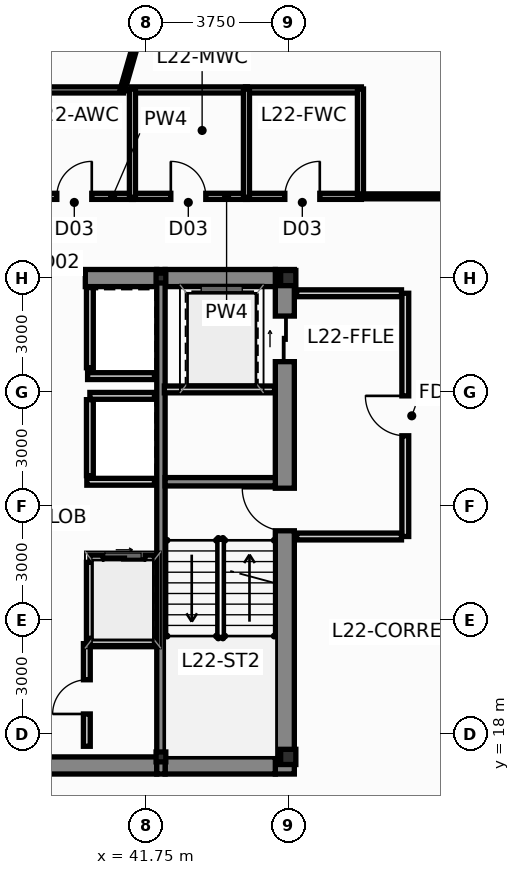
"""IFC4 building model, lengths in metres.
Left out: names, types, materials, properties, quantities, classifications, styles, units other than length and angle.
Written with IfcOpenShell. Run it as: python <this file> out.ifc"""

import sys

from ifc_helpers import new_model, si_unit, direction, frame, frame_2d, origin, origin_2d, place, context, subcontext, project, spatial, rectangle, i_section, extrude, source, transform, mapped, element, fill, save


model = new_model("IFC4")
c1 = context("Model", 3, precision=1e-05, world=origin(), true_north=direction((0.0, 1.0)))
c2 = subcontext(c1, "Body", "Model", "MODEL_VIEW")
j1 = project(units=[si_unit("LENGTHUNIT", "METRE"), si_unit("PLANEANGLEUNIT", "RADIAN")], contexts=[c1])
p1 = place(None, origin())
s1 = spatial("IfcSite", under=j1, at=p1, CompositionType="ELEMENT")
p2 = place(p1, origin())
s2 = spatial("IfcBuilding", under=s1, at=p2, CompositionType="ELEMENT")
p3 = place(p2, frame((0.0, 0.0, 87.15)))
s3 = spatial("IfcBuildingStorey", under=s2, at=p3, CompositionType="ELEMENT", Elevation=87.15)
m1 = source(origin(), c2, "Body", "SweptSolid", [
    extrude(i_section(OverallWidth=0.4, OverallDepth=0.4, WebThickness=0.02, FlangeThickness=0.032, at=origin_2d()), origin(), (0.0, 0.0, 1.0), 3.65),
])
for number, where, z_axis, x_axis in (
    (1, (45.5, 17.4, 0.0), (0.0, 0.0, 1.0), (1.0, 0.0, 0.0)),
    (2, (45.5, 30.0, 0.0), (0.0, 0.0, 1.0), (1.0, 0.0, 0.0)),
):
    element("IfcColumn", number, at=place(p3, frame(where, z_axis=z_axis, x_axis=x_axis)), inside=s3, PredefinedType="COLUMN", context=c2, shape_type="MappedRepresentation", body=[
        mapped(m1, transform((0.0, 0.0, 0.0), scale=1.0)),
    ])
m2 = source(origin(), c2, "Body", "SweptSolid", [
    extrude(i_section(OverallWidth=0.256, OverallDepth=0.26, WebThickness=0.01, FlangeThickness=0.017, at=origin_2d()), origin(), (0.0, 0.0, 1.0), 3.65),
])
for number, where, z_axis, x_axis in (
    (3, (42.15, 17.4, 0.0), (0.0, 0.0, 1.0), (1.0, 0.0, 0.0)),
    (4, (42.15, 30.0, 0.0), (0.0, 0.0, 1.0), (1.0, 0.0, 0.0)),
):
    element("IfcColumn", number, at=place(p3, frame(where, z_axis=z_axis, x_axis=x_axis)), inside=s3, PredefinedType="COLUMN", context=c2, shape_type="MappedRepresentation", body=[
        mapped(m2, transform((0.0, 0.0, 0.0), scale=1.0)),
    ])
p4 = place(p3, frame((45.41, 16.95, 0.0), z_axis=(0.0, 0.0, 1.0), x_axis=(0.0, 1.0, 0.0)))
e5 = element("IfcWall", 5, at=p4, inside=s3, PredefinedType="SHEAR", context=c2, shape_type="SweptSolid", body=[
    extrude(rectangle(XDim=13.275, YDim=0.5, at=frame_2d((6.638, 0.0))), origin(), (0.0, 0.0, 1.0), 3.65),
])
p5 = place(p4, frame((6.4, 0.0, 0.0)))
e6 = element("IfcOpeningElement", 6, at=p5, cuts=e5, PredefinedType="OPENING", context=c2, shape_type="SweptSolid", body=[
    extrude(rectangle(XDim=1.12, YDim=2.15, at=frame_2d((0.56, 1.075))), frame((0.0, 0.262, 0.0), z_axis=(0.0, -1.0, 0.0), x_axis=(1.0, 0.0, 0.0)), (0.0, 0.0, 1.0), 0.524),
])
p6 = place(p4, frame((10.85, 0.0, 0.0)))
e7 = element("IfcOpeningElement", 7, at=p6, cuts=e5, PredefinedType="OPENING", context=c2, shape_type="SweptSolid", body=[
    extrude(rectangle(XDim=1.2, YDim=2.2, at=frame_2d((0.6, 1.1))), frame((0.0, 0.262, 0.0), z_axis=(0.0, -1.0, 0.0), x_axis=(1.0, 0.0, 0.0)), (0.0, 0.0, 1.0), 0.524),
])
p7 = place(p3, frame((33.96, 17.175, 0.0), z_axis=(0.0, 0.0, 1.0), x_axis=(1.0, 0.0, 0.0)))
e8 = element("IfcWall", 8, at=p7, inside=s3, PredefinedType="SHEAR", context=c2, shape_type="SweptSolid", body=[
    extrude(rectangle(XDim=8.08, YDim=0.45, at=frame_2d((4.04, 0.0))), origin(), (0.0, 0.0, 1.0), 3.65),
])
p8 = place(p3, frame((42.26, 17.175, 0.0), z_axis=(0.0, 0.0, 1.0), x_axis=(1.0, 0.0, 0.0)))
e9 = element("IfcWall", 9, at=p8, inside=s3, PredefinedType="SHEAR", context=c2, shape_type="SweptSolid", body=[
    extrude(rectangle(XDim=2.9, YDim=0.45, at=frame_2d((1.45, 0.0))), origin(), (0.0, 0.0, 1.0), 3.65),
])
p9 = place(p3, frame((40.16, 30.0, 0.0), z_axis=(0.0, 0.0, 1.0), x_axis=(1.0, 0.0, 0.0)))
e10 = element("IfcWall", 10, at=p9, inside=s3, PredefinedType="SHEAR", context=c2, shape_type="SweptSolid", body=[
    extrude(rectangle(XDim=1.88, YDim=0.45, at=frame_2d((0.94, 0.0))), origin(), (0.0, 0.0, 1.0), 3.65),
])
p10 = place(p3, frame((42.26, 30.0, 0.0), z_axis=(0.0, 0.0, 1.0), x_axis=(1.0, 0.0, 0.0)))
e11 = element("IfcWall", 11, at=p10, inside=s3, PredefinedType="SHEAR", context=c2, shape_type="SweptSolid", body=[
    extrude(rectangle(XDim=2.9, YDim=0.45, at=frame_2d((1.45, 0.0))), origin(), (0.0, 0.0, 1.0), 3.65),
])
p11 = place(p3, frame((42.15, 16.95, 0.0), z_axis=(0.0, 0.0, 1.0), x_axis=(0.0, 1.0, 0.0)))
e12 = element("IfcWall", 12, at=p11, inside=s3, PredefinedType="SHEAR", context=c2, shape_type="SweptSolid", body=[
    extrude(rectangle(XDim=13.275, YDim=0.22, at=frame_2d((6.638, 0.0))), origin(), (0.0, 0.0, 1.0), 3.65),
])
p12 = place(p3, frame((42.26, 24.64, 0.0), z_axis=(0.0, 0.0, 1.0), x_axis=(1.0, 0.0, 0.0)))
e13 = element("IfcWall", 13, at=p12, inside=s3, PredefinedType="SHEAR", context=c2, shape_type="SweptSolid", body=[
    extrude(rectangle(XDim=2.9, YDim=0.22, at=frame_2d((1.45, 0.0))), origin(), (0.0, 0.0, 1.0), 3.65),
])
p13 = place(p3, frame((40.28, 22.62, 0.0), z_axis=(0.0, 0.0, 1.0), x_axis=(1.0, 0.0, 0.0)))
e14 = element("IfcWall", 14, at=p13, inside=s3, PredefinedType="PARTITIONING", context=c2, shape_type="SweptSolid", body=[
    extrude(rectangle(XDim=1.7, YDim=0.18, at=frame_2d((0.85, 0.0))), origin(), (0.0, 0.0, 1.0), 3.4),
])
p14 = place(p13, frame((0.35, 0.0, 0.0)))
e15 = element("IfcOpeningElement", 15, at=p14, cuts=e14, PredefinedType="OPENING", context=c2, shape_type="SweptSolid", body=[
    extrude(rectangle(XDim=1.1, YDim=2.2, at=frame_2d((0.55, 1.1))), frame((0.0, 0.102, 0.0), z_axis=(0.0, -1.0, 0.0), x_axis=(1.0, 0.0, 0.0)), (0.0, 0.0, 1.0), 0.204),
])
p15 = place(p3, frame((40.28, 20.52, 0.0), z_axis=(0.0, 0.0, 1.0), x_axis=(0.0, 1.0, 0.0)))
e16 = element("IfcWall", 16, at=p15, inside=s3, PredefinedType="PARTITIONING", context=c2, shape_type="SweptSolid", body=[
    extrude(rectangle(XDim=2.0, YDim=0.18, at=frame_2d((1.0, 0.0))), origin(), (0.0, 0.0, 1.0), 3.4),
])
p16 = place(p3, frame((40.28, 26.9, 0.0), z_axis=(0.0, 0.0, 1.0), x_axis=(1.0, 0.0, 0.0)))
e17 = element("IfcWall", 17, at=p16, inside=s3, PredefinedType="PARTITIONING", context=c2, shape_type="SweptSolid", body=[
    extrude(rectangle(XDim=1.7, YDim=0.18, at=frame_2d((0.85, 0.0))), origin(), (0.0, 0.0, 1.0), 3.4),
])
p17 = place(p3, frame((40.28, 24.8, 0.0), z_axis=(0.0, 0.0, 1.0), x_axis=(0.0, 1.0, 0.0)))
e18 = element("IfcWall", 18, at=p17, inside=s3, PredefinedType="PARTITIONING", context=c2, shape_type="SweptSolid", body=[
    extrude(rectangle(XDim=2.0, YDim=0.18, at=frame_2d((1.0, 0.0))), origin(), (0.0, 0.0, 1.0), 3.4),
])
p18 = place(p3, frame((40.2, 24.64, 0.0), z_axis=(0.0, 0.0, 1.0), x_axis=(1.0, 0.0, 0.0)))
e19 = element("IfcWall", 19, at=p18, inside=s3, PredefinedType="PARTITIONING", context=c2, shape_type="SweptSolid", body=[
    extrude(rectangle(XDim=1.78, YDim=0.18, at=frame_2d((0.89, 0.0))), origin(), (0.0, 0.0, 1.0), 3.4),
])
p19 = place(p3, frame((40.22, 27.42, 0.0), z_axis=(0.0, 0.0, 1.0), x_axis=(1.0, 0.0, 0.0)))
e20 = element("IfcWall", 20, at=p19, inside=s3, PredefinedType="PARTITIONING", context=c2, shape_type="SweptSolid", body=[
    extrude(rectangle(XDim=1.76, YDim=0.18, at=frame_2d((0.88, 0.0))), origin(), (0.0, 0.0, 1.0), 3.4),
])
p20 = place(p3, frame((40.28, 27.64, 0.0), z_axis=(0.0, 0.0, 1.0), x_axis=(0.0, 1.0, 0.0)))
e21 = element("IfcWall", 21, at=p20, inside=s3, PredefinedType="PARTITIONING", context=c2, shape_type="SweptSolid", body=[
    extrude(rectangle(XDim=2.11, YDim=0.18, at=frame_2d((1.055, 0.0))), origin(), (0.0, 0.0, 1.0), 3.4),
])
p21 = place(p3, frame((48.58, 23.2, 0.0), z_axis=(0.0, 0.0, 1.0), x_axis=(0.0, 1.0, 0.0)))
e22 = element("IfcWall", 22, at=p21, inside=s3, PredefinedType="PARTITIONING", context=c2, shape_type="SweptSolid", body=[
    extrude(rectangle(XDim=6.4, YDim=0.18, at=frame_2d((3.2, 0.0))), origin(), (0.0, 0.0, 1.0), 3.027),
])
p22 = place(p21, frame((2.65, 0.0, 0.0)))
e23 = element("IfcOpeningElement", 23, at=p22, cuts=e22, PredefinedType="OPENING", context=c2, shape_type="SweptSolid", body=[
    extrude(rectangle(XDim=1.05, YDim=2.15, at=frame_2d((0.525, 1.075))), frame((0.0, 0.102, 0.0), z_axis=(0.0, -1.0, 0.0), x_axis=(1.0, 0.0, 0.0)), (0.0, 0.0, 1.0), 0.204),
])
p23 = place(p3, frame((45.72, 23.2, 0.0), z_axis=(0.0, 0.0, 1.0), x_axis=(1.0, 0.0, 0.0)))
e24 = element("IfcWall", 24, at=p23, inside=s3, PredefinedType="PARTITIONING", context=c2, shape_type="SweptSolid", body=[
    extrude(rectangle(XDim=2.76, YDim=0.18, at=frame_2d((1.38, 0.0))), origin(), (0.0, 0.0, 1.0), 3.4),
])
p24 = place(p3, frame((45.72, 29.6, 0.0), z_axis=(0.0, 0.0, 1.0), x_axis=(1.0, 0.0, 0.0)))
e25 = element("IfcWall", 25, at=p24, inside=s3, PredefinedType="PARTITIONING", context=c2, shape_type="SweptSolid", body=[
    extrude(rectangle(XDim=2.76, YDim=0.18, at=frame_2d((1.38, 0.0))), origin(), (0.0, 0.0, 1.0), 2.783),
])
p25 = place(p3, frame((42.24, 27.07, 0.0), z_axis=(0.0, 0.0, 1.0), x_axis=(1.0, 0.0, 0.0)))
e26 = element("IfcWall", 26, at=p25, inside=s3, PredefinedType="PARTITIONING", context=c2, shape_type="SweptSolid", body=[
    extrude(rectangle(XDim=2.9, YDim=0.18, at=frame_2d((1.45, 0.0))), origin(), (0.0, 0.0, 1.0), 3.4),
])
p26 = place(p3, frame((40.22, 20.42, 0.0), z_axis=(0.0, 0.0, 1.0), x_axis=(1.0, 0.0, 0.0)))
e27 = element("IfcWall", 27, at=p26, inside=s3, PredefinedType="PARTITIONING", context=c2, shape_type="SweptSolid", body=[
    extrude(rectangle(XDim=1.76, YDim=0.18, at=frame_2d((0.88, 0.0))), origin(), (0.0, 0.0, 1.0), 3.4),
])
p27 = place(p3, frame((40.2, 17.68, 0.0), z_axis=(0.0, 0.0, 1.0), x_axis=(0.0, 1.0, 0.0)))
e28 = element("IfcWall", 28, at=p27, inside=s3, PredefinedType="PARTITIONING", context=c2, shape_type="SweptSolid", body=[
    extrude(rectangle(XDim=2.7, YDim=0.18, at=frame_2d((1.35, 0.0))), origin(), (0.0, 0.0, 1.0), 3.4),
])
p28 = place(p27, frame((0.85, 0.0, 0.0)))
e29 = element("IfcOpeningElement", 29, at=p28, cuts=e28, PredefinedType="OPENING", context=c2, shape_type="SweptSolid", body=[
    extrude(rectangle(XDim=0.9, YDim=2.1, at=frame_2d((0.45, 1.05))), frame((0.0, 0.102, 0.0), z_axis=(0.0, -1.0, 0.0), x_axis=(1.0, 0.0, 0.0)), (0.0, 0.0, 1.0), 0.204),
])
p29 = place(p3, frame((38.375, 32.15, 0.0), z_axis=(0.0, 0.0, 1.0), x_axis=(1.0, 0.0, 0.0)))
e30 = element("IfcWall", 30, at=p29, inside=s3, PredefinedType="PLUMBINGWALL", context=c2, shape_type="SweptSolid", body=[
    extrude(rectangle(XDim=3.05, YDim=0.16, at=frame_2d((1.525, 0.0))), origin(), (0.0, 0.0, 1.0), 3.4),
])
p30 = place(p29, frame((1.035, 0.0, 0.0)))
e31 = element("IfcOpeningElement", 31, at=p30, cuts=e30, PredefinedType="OPENING", context=c2, shape_type="SweptSolid", body=[
    extrude(rectangle(XDim=0.92, YDim=2.1, at=frame_2d((0.46, 1.05))), frame((0.0, 0.092, 0.0), z_axis=(0.0, -1.0, 0.0), x_axis=(1.0, 0.0, 0.0)), (0.0, 0.0, 1.0), 0.184),
])
p31 = place(p3, frame((41.375, 32.15, 0.0), z_axis=(0.0, 0.0, 1.0), x_axis=(1.0, 0.0, 0.0)))
e32 = element("IfcWall", 32, at=p31, inside=s3, PredefinedType="PLUMBINGWALL", context=c2, shape_type="SweptSolid", body=[
    extrude(rectangle(XDim=3.05, YDim=0.16, at=frame_2d((1.525, 0.0))), origin(), (0.0, 0.0, 1.0), 3.4),
])
p32 = place(p31, frame((1.035, 0.0, 0.0)))
e33 = element("IfcOpeningElement", 33, at=p32, cuts=e32, PredefinedType="OPENING", context=c2, shape_type="SweptSolid", body=[
    extrude(rectangle(XDim=0.92, YDim=2.1, at=frame_2d((0.46, 1.05))), frame((0.0, 0.092, 0.0), z_axis=(0.0, -1.0, 0.0), x_axis=(1.0, 0.0, 0.0)), (0.0, 0.0, 1.0), 0.184),
])
p33 = place(p3, frame((44.375, 32.15, 0.0), z_axis=(0.0, 0.0, 1.0), x_axis=(1.0, 0.0, 0.0)))
e34 = element("IfcWall", 34, at=p33, inside=s3, PredefinedType="PLUMBINGWALL", context=c2, shape_type="SweptSolid", body=[
    extrude(rectangle(XDim=3.05, YDim=0.16, at=frame_2d((1.525, 0.0))), origin(), (0.0, 0.0, 1.0), 3.4),
])
p34 = place(p33, frame((1.035, 0.0, 0.0)))
e35 = element("IfcOpeningElement", 35, at=p34, cuts=e34, PredefinedType="OPENING", context=c2, shape_type="SweptSolid", body=[
    extrude(rectangle(XDim=0.92, YDim=2.1, at=frame_2d((0.46, 1.05))), frame((0.0, 0.092, 0.0), z_axis=(0.0, -1.0, 0.0), x_axis=(1.0, 0.0, 0.0)), (0.0, 0.0, 1.0), 0.184),
])
for number, where, z_axis, x_axis in (
    (36, (41.375, 34.95, 0.0), (0.0, 0.0, 1.0), (1.0, 0.0, 0.0)),
    (37, (47.425, 34.95, 0.0), (0.0, 0.0, 1.0), (-1.0, 0.0, 0.0)),
):
    element("IfcWall", number, at=place(p3, frame(where, z_axis=z_axis, x_axis=x_axis)), inside=s3, PredefinedType="PLUMBINGWALL", context=c2, shape_type="SweptSolid", body=[
        extrude(rectangle(XDim=3.05, YDim=0.16, at=frame_2d((1.525, 0.0))), origin(), (0.0, 0.0, 1.0), 3.027),
    ])
for number, where, z_axis, x_axis in (
    (38, (41.4, 32.125, 0.0), (0.0, 0.0, 1.0), (0.0, 1.0, 0.0)),
    (39, (44.4, 32.125, 0.0), (0.0, 0.0, 1.0), (0.0, 1.0, 0.0)),
    (40, (47.4, 32.125, 0.0), (0.0, 0.0, 1.0), (0.0, 1.0, 0.0)),
):
    element("IfcWall", number, at=place(p3, frame(where, z_axis=z_axis, x_axis=x_axis)), inside=s3, PredefinedType="PLUMBINGWALL", context=c2, shape_type="SweptSolid", body=[
        extrude(rectangle(XDim=2.85, YDim=0.16, at=frame_2d((1.425, 0.0))), origin(), (0.0, 0.0, 1.0), 3.4),
    ])
p35 = place(p3, frame((38.375, 34.95, 0.0), z_axis=(0.0, 0.0, 1.0), x_axis=(1.0, 0.0, 0.0)))
e41 = element("IfcWall", 41, at=p35, inside=s3, PredefinedType="PLUMBINGWALL", context=c2, shape_type="SweptSolid", body=[
    extrude(rectangle(XDim=2.79, YDim=0.16, at=frame_2d((1.395, 0.0))), origin(), (0.0, 0.0, 1.0), 3.027),
])
p36 = place(p3, frame((41.141, 34.955, 0.0), z_axis=(0.0, 0.0, 1.0), x_axis=(0.275853145279, 0.961199793092, 0.0)))
e42 = element("IfcWall", 42, at=p36, inside=s3, PredefinedType="PARTITIONING", context=c2, shape_type="SweptSolid", body=[
    extrude(rectangle(XDim=15.265, YDim=0.13, at=frame_2d((7.633, 0.0))), origin(), (0.0, 0.0, 1.0), 3.4),
])
p37 = place(p3, frame((47.405, 32.15, 0.0), z_axis=(0.0, 0.0, 1.0), x_axis=(1.0, 0.0, 0.0)))
e43 = element("IfcWall", 43, at=p37, inside=s3, PredefinedType="PARTITIONING", context=c2, shape_type="SweptSolid", body=[
    extrude(rectangle(XDim=3.19, YDim=0.13, at=frame_2d((1.595, 0.0))), origin(), (0.0, 0.0, 1.0), 3.4),
])
p38 = place(p5, origin())
e44 = element("IfcDoor", 44, at=p38, inside=s3, OperationType="SINGLE_SWING_RIGHT", PredefinedType="DOOR", context=c2, shape_type="SweptSolid", body=[
    extrude(rectangle(XDim=1.12, YDim=2.15, at=frame_2d((0.56, 1.075))), frame((0.0, 0.025, 0.0), z_axis=(0.0, -1.0, 0.0), x_axis=(1.0, 0.0, 0.0)), (0.0, 0.0, 1.0), 0.05),
])
fill(e6, e44)
p39 = place(p6, origin())
e45 = element("IfcDoor", 45, at=p39, inside=s3, OperationType="SLIDING_TO_RIGHT", PredefinedType="DOOR", context=c2, shape_type="SweptSolid", body=[
    extrude(rectangle(XDim=1.2, YDim=2.2, at=frame_2d((0.6, 1.1))), frame((0.0, 0.025, 0.0), z_axis=(0.0, -1.0, 0.0), x_axis=(1.0, 0.0, 0.0)), (0.0, 0.0, 1.0), 0.05),
])
fill(e7, e45)
p40 = place(p14, origin())
e46 = element("IfcDoor", 46, at=p40, inside=s3, OperationType="SLIDING_TO_LEFT", PredefinedType="DOOR", context=c2, shape_type="SweptSolid", body=[
    extrude(rectangle(XDim=1.1, YDim=2.2, at=frame_2d((0.55, 1.1))), frame((0.0, 0.025, 0.0), z_axis=(0.0, -1.0, 0.0), x_axis=(1.0, 0.0, 0.0)), (0.0, 0.0, 1.0), 0.05),
])
fill(e15, e46)
p41 = place(p22, origin())
e47 = element("IfcDoor", 47, at=p41, inside=s3, OperationType="SINGLE_SWING_RIGHT", PredefinedType="DOOR", context=c2, shape_type="SweptSolid", body=[
    extrude(rectangle(XDim=1.05, YDim=2.15, at=frame_2d((0.525, 1.075))), frame((0.0, 0.025, 0.0), z_axis=(0.0, -1.0, 0.0), x_axis=(1.0, 0.0, 0.0)), (0.0, 0.0, 1.0), 0.05),
])
fill(e23, e47)
p42 = place(p28, origin())
e48 = element("IfcDoor", 48, at=p42, inside=s3, OperationType="SINGLE_SWING_LEFT", PredefinedType="DOOR", context=c2, shape_type="SweptSolid", body=[
    extrude(rectangle(XDim=0.9, YDim=2.1, at=frame_2d((0.45, 1.05))), frame((0.0, 0.025, 0.0), z_axis=(0.0, -1.0, 0.0), x_axis=(1.0, 0.0, 0.0)), (0.0, 0.0, 1.0), 0.05),
])
fill(e29, e48)
p43 = place(p30, origin())
e49 = element("IfcDoor", 49, at=p43, inside=s3, OperationType="SINGLE_SWING_RIGHT", PredefinedType="DOOR", context=c2, shape_type="SweptSolid", body=[
    extrude(rectangle(XDim=0.92, YDim=2.1, at=frame_2d((0.46, 1.05))), frame((0.0, 0.025, 0.0), z_axis=(0.0, -1.0, 0.0), x_axis=(1.0, 0.0, 0.0)), (0.0, 0.0, 1.0), 0.05),
])
fill(e31, e49)
p44 = place(p32, origin())
e50 = element("IfcDoor", 50, at=p44, inside=s3, OperationType="SINGLE_SWING_LEFT", PredefinedType="DOOR", context=c2, shape_type="SweptSolid", body=[
    extrude(rectangle(XDim=0.92, YDim=2.1, at=frame_2d((0.46, 1.05))), frame((0.0, 0.025, 0.0), z_axis=(0.0, -1.0, 0.0), x_axis=(1.0, 0.0, 0.0)), (0.0, 0.0, 1.0), 0.05),
])
fill(e33, e50)
p45 = place(p34, origin())
e51 = element("IfcDoor", 51, at=p45, inside=s3, OperationType="SINGLE_SWING_RIGHT", PredefinedType="DOOR", context=c2, shape_type="SweptSolid", body=[
    extrude(rectangle(XDim=0.92, YDim=2.1, at=frame_2d((0.46, 1.05))), frame((0.0, 0.025, 0.0), z_axis=(0.0, -1.0, 0.0), x_axis=(1.0, 0.0, 0.0)), (0.0, 0.0, 1.0), 0.05),
])
fill(e35, e51)
save(model, sys.argv[1])
